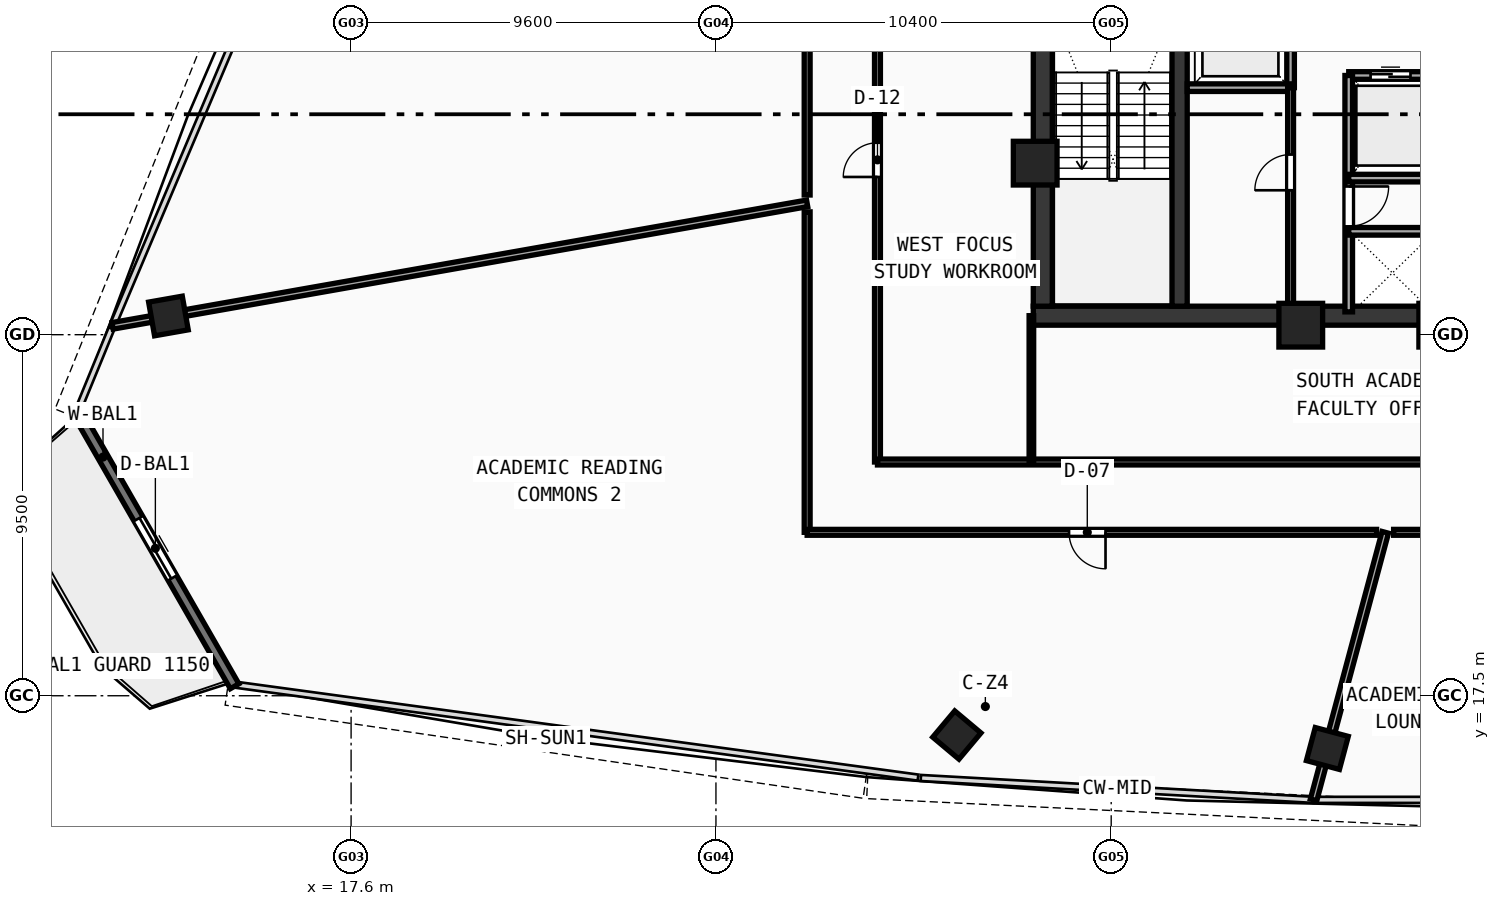
"""IFC4 building model, lengths in metres.
Left out: names, types, materials, properties, quantities, classifications, styles, units other than length and angle.
Written with IfcOpenShell. Run it as: python <this file> out.ifc"""

import sys

from ifc_helpers import new_model, si_unit, direction, frame, frame_2d, origin, origin_with_axes, origin_2d, place, context, subcontext, project, spatial, rectangle, hollow_rectangle, extrude, source, transform, mapped, element, fill, save


model = new_model("IFC4")
c1 = context("Model", 3, precision=1e-05, world=origin(), true_north=direction((0.0, 1.0)))
c2 = subcontext(c1, "Body", "Model", "MODEL_VIEW")
j1 = project(units=[si_unit("LENGTHUNIT", "METRE"), si_unit("PLANEANGLEUNIT", "RADIAN")], contexts=[c1])
p1 = place(None, origin())
s1 = spatial("IfcSite", under=j1, at=p1, CompositionType="ELEMENT")
p2 = place(p1, origin())
s2 = spatial("IfcBuilding", under=s1, at=p2, CompositionType="ELEMENT")
p3 = place(p2, frame((0.0, 0.0, 215.16)))
s3 = spatial("IfcBuildingStorey", under=s2, at=p3, CompositionType="ELEMENT", Elevation=215.16)
p4 = place(p3, frame((35.55, 27.5, 0.0), z_axis=(0.0, 0.0, 1.0), x_axis=(1.0, 0.0, 0.0)))
e1 = element("IfcWall", 1, at=p4, inside=s3, PredefinedType="SHEAR", context=c2, shape_type="SweptSolid", body=[
    extrude(rectangle(XDim=24.9, YDim=0.5, at=frame_2d((12.45, 0.0))), origin(), (0.0, 0.0, 1.0), 3.52),
])
p5 = place(p3, frame((35.8, 27.75, 0.0), z_axis=(0.0, 0.0, 1.0), x_axis=(0.0, 1.0, 0.0)))
e2 = element("IfcWall", 2, at=p5, inside=s3, PredefinedType="SHEAR", context=c2, shape_type="SweptSolid", body=[
    extrude(rectangle(XDim=12.2, YDim=0.5, at=frame_2d((6.1, 0.0))), origin(), (0.0, 0.0, 1.0), 3.52),
])
p6 = place(p3, frame((39.4, 27.75, 0.0), z_axis=(0.0, 0.0, 1.0), x_axis=(0.0, 1.0, 0.0)))
e3 = element("IfcWall", 3, at=p6, inside=s3, PredefinedType="SHEAR", context=c2, shape_type="SweptSolid", body=[
    extrude(rectangle(XDim=12.2, YDim=0.4, at=frame_2d((6.1, 0.0))), origin(), (0.0, 0.0, 1.0), 3.52),
])
p7 = place(p6, frame((10.0, 0.0, 0.0)))
e4 = element("IfcOpeningElement", 4, at=p7, cuts=e3, PredefinedType="OPENING", context=c2, shape_type="SweptSolid", body=[
    extrude(rectangle(XDim=1.1, YDim=2.1, at=frame_2d((0.55, 1.05))), frame((0.0, 0.21, 0.0), z_axis=(0.0, -1.0, 0.0), x_axis=(1.0, 0.0, 0.0)), (0.0, 0.0, 1.0), 0.42),
])
m1 = source(origin(), c2, "Body", "SweptSolid", [
    extrude(hollow_rectangle(XDim=1.15, YDim=1.15, WallThickness=0.048, at=origin_2d()), origin(), (0.0, 0.0, 1.0), 3.78),
])
for number, where, z_axis, x_axis in (
    (5, (42.588, 27.25, -0.26), (0.0, 0.0, 1.0), (1.0, 0.0, 0.0)),
    (6, (46.272, 27.25, -0.26), (0.0, 0.0, 1.0), (1.0, 0.0, 0.0)),
    (7, (35.6, 31.513, -0.26), (0.0, 0.0, 1.0), (1.0, 0.0, 0.0)),
):
    element("IfcColumn", number, at=place(p3, frame(where, z_axis=z_axis, x_axis=x_axis)), inside=s3, PredefinedType="COLUMN", context=c2, shape_type="MappedRepresentation", body=[
        mapped(m1, transform((0.0, 0.0, 0.0), scale=1.0)),
    ])
m2 = source(origin(), c2, "Body", "SweptSolid", [
    extrude(hollow_rectangle(XDim=0.9, YDim=0.9, WallThickness=0.036, at=origin_2d()), origin(), (0.0, 0.0, 1.0), 3.78),
])
for number, where, z_axis, x_axis in (
    (8, (33.539, 16.466, -0.26), (0.0, 0.0, 1.0), (0.766, -0.643, 0.0)),
    (9, (43.288, 16.112, -0.26), (0.0, 0.0, 1.0), (0.966, -0.259, 0.0)),
    (10, (12.793, 27.492, -0.26), (0.0, 0.0, 1.0), (0.174, -0.985, 0.0)),
):
    element("IfcColumn", number, at=place(p3, frame(where, z_axis=z_axis, x_axis=x_axis)), inside=s3, PredefinedType="COLUMN", context=c2, shape_type="MappedRepresentation", body=[
        mapped(m2, transform((0.0, 0.0, 0.0), scale=1.0)),
    ])
p8 = place(p3, frame((10.365, 25.01, 0.0), z_axis=(0.0, 0.0, 1.0), x_axis=(0.497934125263, -0.867214856249, 0.0)))
e11 = element("IfcWall", 11, at=p8, inside=s3, PredefinedType="STANDARD", context=c2, shape_type="SweptSolid", body=[
    extrude(rectangle(XDim=8.373, YDim=0.26, at=frame_2d((4.186, 0.0))), origin(), (0.0, 0.0, 1.0), 3.52),
])
p9 = place(p8, frame((3.286, 0.0, 0.0)))
e12 = element("IfcOpeningElement", 12, at=p9, cuts=e11, PredefinedType="OPENING", context=c2, shape_type="SweptSolid", body=[
    extrude(rectangle(XDim=1.8, YDim=2.15, at=frame_2d((0.9, 1.075))), frame((0.0, 0.14, 0.0), z_axis=(0.0, -1.0, 0.0), x_axis=(1.0, 0.0, 0.0)), (0.0, 0.0, 1.0), 0.28),
])
p10 = place(p3, frame((42.32, 33.5, 0.0), z_axis=(0.0, 0.0, 1.0), x_axis=(0.0, 1.0, 0.0)))
e13 = element("IfcWall", 13, at=p10, inside=s3, PredefinedType="SOLIDWALL", context=c2, shape_type="SweptSolid", body=[
    extrude(rectangle(XDim=6.45, YDim=0.2, at=frame_2d((3.225, 0.0))), origin(), (0.0, 0.0, 1.0), 3.52),
])
p11 = place(p10, frame((1.0, 0.0, 0.0)))
e14 = element("IfcOpeningElement", 14, at=p11, cuts=e13, PredefinedType="OPENING", context=c2, shape_type="SweptSolid", body=[
    extrude(rectangle(XDim=1.05, YDim=2.1, at=frame_2d((0.525, 1.05))), frame((0.0, 0.11, 0.0), z_axis=(0.0, -1.0, 0.0), x_axis=(1.0, 0.0, 0.0)), (0.0, 0.0, 1.0), 0.22),
])
p12 = place(p3, frame((39.6, 33.5, 0.0), z_axis=(0.0, 0.0, 1.0), x_axis=(1.0, 0.0, 0.0)))
e15 = element("IfcWall", 15, at=p12, inside=s3, PredefinedType="SOLIDWALL", context=c2, shape_type="SweptSolid", body=[
    extrude(rectangle(XDim=2.72, YDim=0.2, at=frame_2d((1.36, 0.0))), origin(), (0.0, 0.0, 1.0), 3.52),
])
p13 = place(p3, frame((43.85, 33.82, 0.0), z_axis=(0.0, 0.0, 1.0), x_axis=(1.0, 0.0, 0.0)))
e16 = element("IfcWall", 16, at=p13, inside=s3, PredefinedType="SOLIDWALL", context=c2, shape_type="SweptSolid", body=[
    extrude(rectangle(XDim=9.83, YDim=0.2, at=frame_2d((4.915, 0.0))), origin(), (0.0, 0.0, 1.0), 3.52),
])
p14 = place(p13, frame((0.575, 0.0, 0.0)))
e17 = element("IfcOpeningElement", 17, at=p14, cuts=e16, PredefinedType="OPENING", context=c2, shape_type="SweptSolid", body=[
    extrude(rectangle(XDim=1.05, YDim=2.1, at=frame_2d((0.525, 1.05))), frame((0.0, 0.11, 0.0), z_axis=(0.0, -1.0, 0.0), x_axis=(1.0, 0.0, 0.0)), (0.0, 0.0, 1.0), 0.22),
])
p15 = place(p13, frame((2.875, 0.0, 0.0)))
e18 = element("IfcOpeningElement", 18, at=p15, cuts=e16, PredefinedType="OPENING", context=c2, shape_type="SweptSolid", body=[
    extrude(rectangle(XDim=1.05, YDim=2.1, at=frame_2d((0.525, 1.05))), frame((0.0, 0.11, 0.0), z_axis=(0.0, -1.0, 0.0), x_axis=(1.0, 0.0, 0.0)), (0.0, 0.0, 1.0), 0.22),
])
p16 = place(p13, frame((5.175, 0.0, 0.0)))
e19 = element("IfcOpeningElement", 19, at=p16, cuts=e16, PredefinedType="OPENING", context=c2, shape_type="SweptSolid", body=[
    extrude(rectangle(XDim=1.05, YDim=2.1, at=frame_2d((0.525, 1.05))), frame((0.0, 0.11, 0.0), z_axis=(0.0, -1.0, 0.0), x_axis=(1.0, 0.0, 0.0)), (0.0, 0.0, 1.0), 0.22),
])
p17 = place(p13, frame((7.475, 0.0, 0.0)))
e20 = element("IfcOpeningElement", 20, at=p17, cuts=e16, PredefinedType="OPENING", context=c2, shape_type="SweptSolid", body=[
    extrude(rectangle(XDim=1.05, YDim=2.1, at=frame_2d((0.525, 1.05))), frame((0.0, 0.11, 0.0), z_axis=(0.0, -1.0, 0.0), x_axis=(1.0, 0.0, 0.0)), (0.0, 0.0, 1.0), 0.22),
])
p18 = place(p3, frame((43.85, 27.6, 0.0), z_axis=(0.0, 0.0, 1.0), x_axis=(0.0, 1.0, 0.0)))
e21 = element("IfcWall", 21, at=p18, inside=s3, PredefinedType="SOLIDWALL", context=c2, shape_type="SweptSolid", body=[
    extrude(rectangle(XDim=6.22, YDim=0.2, at=frame_2d((3.11, 0.0))), origin(), (0.0, 0.0, 1.0), 3.52),
])
p19 = place(p18, frame((2.25, 0.0, 0.0)))
e22 = element("IfcOpeningElement", 22, at=p19, cuts=e21, PredefinedType="OPENING", context=c2, shape_type="SweptSolid", body=[
    extrude(rectangle(XDim=1.05, YDim=2.1, at=frame_2d((0.525, 1.05))), frame((0.0, 0.11, 0.0), z_axis=(0.0, -1.0, 0.0), x_axis=(1.0, 0.0, 0.0)), (0.0, 0.0, 1.0), 0.22),
])
p20 = place(p3, frame((43.85, 29.72, 0.0), z_axis=(0.0, 0.0, 1.0), x_axis=(1.0, 0.0, 0.0)))
e23 = element("IfcWall", 23, at=p20, inside=s3, PredefinedType="SOLIDWALL", context=c2, shape_type="SweptSolid", body=[
    extrude(rectangle(XDim=7.2, YDim=0.2, at=frame_2d((3.6, 0.0))), origin(), (0.0, 0.0, 1.0), 3.52),
])
p21 = place(p3, frame((43.85, 31.12, 0.0), z_axis=(0.0, 0.0, 1.0), x_axis=(1.0, 0.0, 0.0)))
e24 = element("IfcWall", 24, at=p21, inside=s3, PredefinedType="SOLIDWALL", context=c2, shape_type="SweptSolid", body=[
    extrude(rectangle(XDim=9.83, YDim=0.2, at=frame_2d((4.915, 0.0))), origin(), (0.0, 0.0, 1.0), 3.52),
])
p22 = place(p3, frame((42.32, 27.6, 0.0), z_axis=(0.0, 0.0, 1.0), x_axis=(0.0, 1.0, 0.0)))
e25 = element("IfcWall", 25, at=p22, inside=s3, PredefinedType="PARTITIONING", context=c2, shape_type="SweptSolid", body=[
    extrude(rectangle(XDim=5.9, YDim=0.155, at=frame_2d((2.95, 0.0))), origin(), (0.0, 0.0, 1.0), 3.52),
])
p23 = place(p22, frame((3.2, 0.0, 0.0)))
e26 = element("IfcOpeningElement", 26, at=p23, cuts=e25, PredefinedType="OPENING", context=c2, shape_type="SweptSolid", body=[
    extrude(rectangle(XDim=0.94, YDim=2.1, at=frame_2d((0.47, 1.05))), frame((0.0, 0.087, 0.0), z_axis=(0.0, -1.0, 0.0), x_axis=(1.0, 0.0, 0.0)), (0.0, 0.0, 1.0), 0.175),
])
p24 = place(p3, frame((31.45, 23.65, 0.0), z_axis=(0.0, 0.0, 1.0), x_axis=(0.0, 1.0, 0.0)))
e27 = element("IfcWall", 27, at=p24, inside=s3, PredefinedType="PARTITIONING", context=c2, shape_type="SweptSolid", body=[
    extrude(rectangle(XDim=16.6, YDim=0.155, at=frame_2d((8.3, 0.0))), origin(), (0.0, 0.0, 1.0), 2.87),
])
p25 = place(p24, frame((7.5, 0.0, 0.0)))
e28 = element("IfcOpeningElement", 28, at=p25, cuts=e27, PredefinedType="OPENING", context=c2, shape_type="SweptSolid", body=[
    extrude(rectangle(XDim=0.9, YDim=2.08, at=frame_2d((0.45, 1.04))), frame((0.0, 0.087, 0.0), z_axis=(0.0, -1.0, 0.0), x_axis=(1.0, 0.0, 0.0)), (0.0, 0.0, 1.0), 0.175),
])
p26 = place(p3, frame((31.45, 23.65, 0.0), z_axis=(0.0, 0.0, 1.0), x_axis=(1.0, 0.0, 0.0)))
e29 = element("IfcWall", 29, at=p26, inside=s3, PredefinedType="PARTITIONING", context=c2, shape_type="SweptSolid", body=[
    extrude(rectangle(XDim=33.1, YDim=0.155, at=frame_2d((16.55, 0.0))), origin(), (0.0, 0.0, 1.0), 2.87),
])
p27 = place(p26, frame((16.0, 0.0, 0.0)))
e30 = element("IfcOpeningElement", 30, at=p27, cuts=e29, PredefinedType="OPENING", context=c2, shape_type="SweptSolid", body=[
    extrude(rectangle(XDim=0.92, YDim=2.1, at=frame_2d((0.46, 1.05))), frame((0.0, 0.087, 0.0), z_axis=(0.0, -1.0, 0.0), x_axis=(1.0, 0.0, 0.0)), (0.0, 0.0, 1.0), 0.175),
])
p28 = place(p3, frame((35.5, 23.65, 0.0), z_axis=(0.0, 0.0, 1.0), x_axis=(0.0, 1.0, 0.0)))
e31 = element("IfcWall", 31, at=p28, inside=s3, PredefinedType="PARTITIONING", context=c2, shape_type="SweptSolid", body=[
    extrude(rectangle(XDim=3.85, YDim=0.12, at=frame_2d((1.925, 0.0))), origin(), (0.0, 0.0, 1.0), 3.12),
])
p29 = place(p3, frame((29.6, 30.456, 0.0), z_axis=(0.0, 0.0, 1.0), x_axis=(-0.984808051039, -0.173646487465, 0.0)))
e32 = element("IfcWall", 32, at=p29, inside=s3, PredefinedType="PARTITIONING", context=c2, shape_type="SweptSolid", body=[
    extrude(rectangle(XDim=18.557, YDim=0.175, at=frame_2d((9.279, 0.0))), origin(), (0.0, 0.0, 1.0), 2.87),
])
p30 = place(p3, frame((44.811, 21.8, 0.0), z_axis=(0.0, 0.0, 1.0), x_axis=(-0.258817575638, -0.96592622003, 0.0)))
e33 = element("IfcWall", 33, at=p30, inside=s3, PredefinedType="PARTITIONING", context=c2, shape_type="SweptSolid", body=[
    extrude(rectangle(XDim=7.288, YDim=0.175, at=frame_2d((3.644, 0.0))), origin(), (0.0, 0.0, 1.0), 2.87),
])
p31 = place(p3, frame((29.6, 21.8, 0.0), z_axis=(0.0, 0.0, 1.0), x_axis=(0.0, 1.0, 0.0)))
e34 = element("IfcWall", 34, at=p31, inside=s3, PredefinedType="PARTITIONING", context=c2, shape_type="SweptSolid", body=[
    extrude(rectangle(XDim=8.432, YDim=0.155, at=frame_2d((4.216, 0.0))), origin(), (0.0, 0.0, 1.0), 3.12),
])
p32 = place(p3, frame((29.6, 30.675, 0.0), z_axis=(0.0, 0.0, 1.0), x_axis=(0.0, 1.0, 0.0)))
e35 = element("IfcWall", 35, at=p32, inside=s3, PredefinedType="PARTITIONING", context=c2, shape_type="SweptSolid", body=[
    extrude(rectangle(XDim=19.372, YDim=0.155, at=frame_2d((9.686, 0.0))), origin(), (0.0, 0.0, 1.0), 2.87),
])
p33 = place(p32, frame((9.211, 0.0, 0.0)))
e36 = element("IfcOpeningElement", 36, at=p33, cuts=e35, PredefinedType="OPENING", context=c2, shape_type="SweptSolid", body=[
    extrude(rectangle(XDim=0.96, YDim=2.12, at=frame_2d((0.48, 1.06))), frame((0.0, 0.087, 0.0), z_axis=(0.0, -1.0, 0.0), x_axis=(1.0, 0.0, 0.0)), (0.0, 0.0, 1.0), 0.175),
])
p34 = place(p3, frame((47.78, 21.8, 0.0), z_axis=(0.0, 0.0, 1.0), x_axis=(-1.0, 0.0, 0.0)))
e37 = element("IfcWall", 37, at=p34, inside=s3, PredefinedType="PARTITIONING", context=c2, shape_type="SweptSolid", body=[
    extrude(rectangle(XDim=2.749, YDim=0.155, at=frame_2d((1.375, 0.0))), origin(), (0.0, 0.0, 1.0), 3.52),
])
p35 = place(p34, frame((0.914, 0.0, 0.0)))
e38 = element("IfcOpeningElement", 38, at=p35, cuts=e37, PredefinedType="OPENING", context=c2, shape_type="SweptSolid", body=[
    extrude(rectangle(XDim=0.9, YDim=2.08, at=frame_2d((0.45, 1.04))), frame((0.0, 0.087, 0.0), z_axis=(0.0, -1.0, 0.0), x_axis=(1.0, 0.0, 0.0)), (0.0, 0.0, 1.0), 0.175),
])
p36 = place(p3, frame((44.583, 21.8, 0.0), z_axis=(0.0, 0.0, 1.0), x_axis=(-1.0, 0.0, 0.0)))
e39 = element("IfcWall", 39, at=p36, inside=s3, PredefinedType="PARTITIONING", context=c2, shape_type="SweptSolid", body=[
    extrude(rectangle(XDim=14.983, YDim=0.155, at=frame_2d((7.492, 0.0))), origin(), (0.0, 0.0, 1.0), 2.87),
])
p37 = place(p36, frame((7.133, 0.0, 0.0)))
e40 = element("IfcOpeningElement", 40, at=p37, cuts=e39, PredefinedType="OPENING", context=c2, shape_type="SweptSolid", body=[
    extrude(rectangle(XDim=0.96, YDim=2.12, at=frame_2d((0.48, 1.06))), frame((0.0, 0.087, 0.0), z_axis=(0.0, -1.0, 0.0), x_axis=(1.0, 0.0, 0.0)), (0.0, 0.0, 1.0), 0.175),
])
m3 = source(origin(), c2, "Body", "SweptSolid", [
    extrude(rectangle(XDim=1.8, YDim=2.15, at=frame_2d((0.9, 1.075))), frame((0.0, 0.025, 0.0), z_axis=(0.0, -1.0, 0.0), x_axis=(1.0, 0.0, 0.0)), (0.0, 0.0, 1.0), 0.05),
])
p38 = place(p9, origin_with_axes())
e41 = element("IfcDoor", 41, at=p38, inside=s3, OperationType="DOUBLE_DOOR_SLIDING", PredefinedType="DOOR", context=c2, shape_type="MappedRepresentation", body=[
    mapped(m3, transform((0.0, 0.0, 0.0), scale=1.0)),
])
fill(e12, e41)
m4 = source(origin(), c2, "Body", "SweptSolid", [
    extrude(rectangle(XDim=1.05, YDim=2.1, at=frame_2d((0.525, 1.05))), frame((0.0, 0.025, 0.0), z_axis=(0.0, -1.0, 0.0), x_axis=(1.0, 0.0, 0.0)), (0.0, 0.0, 1.0), 0.05),
])
p39 = place(p14, origin_with_axes())
e42 = element("IfcDoor", 42, at=p39, inside=s3, OperationType="DOUBLE_DOOR_SLIDING", PredefinedType="DOOR", context=c2, shape_type="MappedRepresentation", body=[
    mapped(m4, transform((0.0, 0.0, 0.0), scale=1.0)),
])
fill(e17, e42)
p40 = place(p19, frame((1.05, 0.0, 0.0), z_axis=(0.0, 0.0, 1.0), x_axis=(-1.0, 0.0, 0.0)))
e43 = element("IfcDoor", 43, at=p40, inside=s3, OperationType="SINGLE_SWING_LEFT", PredefinedType="DOOR", context=c2, shape_type="MappedRepresentation", body=[
    mapped(m4, transform((0.0, 0.0, 0.0), scale=1.0)),
])
fill(e22, e43)
m5 = source(origin(), c2, "Body", "SweptSolid", [
    extrude(rectangle(XDim=0.94, YDim=2.1, at=frame_2d((0.47, 1.05))), frame((0.0, 0.025, 0.0), z_axis=(0.0, -1.0, 0.0), x_axis=(1.0, 0.0, 0.0)), (0.0, 0.0, 1.0), 0.05),
])
p41 = place(p23, origin_with_axes())
e44 = element("IfcDoor", 44, at=p41, inside=s3, OperationType="SINGLE_SWING_LEFT", PredefinedType="DOOR", context=c2, shape_type="MappedRepresentation", body=[
    mapped(m5, transform((0.0, 0.0, 0.0), scale=1.0)),
])
fill(e26, e44)
m6 = source(origin(), c2, "Body", "SweptSolid", [
    extrude(rectangle(XDim=0.9, YDim=2.08, at=frame_2d((0.45, 1.04))), frame((0.0, 0.025, 0.0), z_axis=(0.0, -1.0, 0.0), x_axis=(1.0, 0.0, 0.0)), (0.0, 0.0, 1.0), 0.05),
])
p42 = place(p25, origin_with_axes())
e45 = element("IfcDoor", 45, at=p42, inside=s3, OperationType="SINGLE_SWING_LEFT", PredefinedType="DOOR", context=c2, shape_type="MappedRepresentation", body=[
    mapped(m6, transform((0.0, 0.0, 0.0), scale=1.0)),
])
fill(e28, e45)
m7 = source(origin(), c2, "Body", "SweptSolid", [
    extrude(rectangle(XDim=0.96, YDim=2.12, at=frame_2d((0.48, 1.06))), frame((0.0, 0.025, 0.0), z_axis=(0.0, -1.0, 0.0), x_axis=(1.0, 0.0, 0.0)), (0.0, 0.0, 1.0), 0.05),
])
p43 = place(p37, origin_with_axes())
e46 = element("IfcDoor", 46, at=p43, inside=s3, OperationType="SINGLE_SWING_LEFT", PredefinedType="DOOR", context=c2, shape_type="MappedRepresentation", body=[
    mapped(m7, transform((0.0, 0.0, 0.0), scale=1.0)),
])
fill(e40, e46)
save(model, sys.argv[1])
